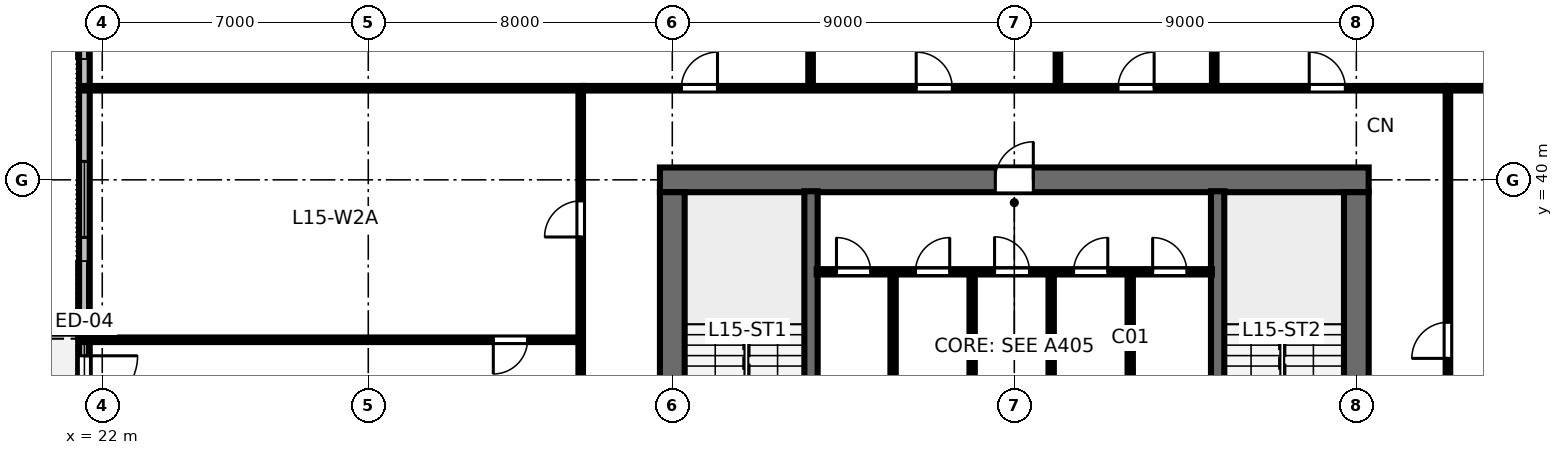
"""IFC4 building model, lengths in metres.
Left out: names, types, materials, properties, quantities, classifications, styles, units other than length and angle.
Written with IfcOpenShell. Run it as: python <this file> out.ifc"""

import sys

from ifc_helpers import new_model, si_unit, direction, frame, frame_2d, origin, place, context, subcontext, project, spatial, rectangle, extrude, element, fill, save


model = new_model("IFC4")
c1 = context("Model", 3, precision=1e-05, world=origin(), true_north=direction((0.0, 1.0)))
c2 = subcontext(c1, "Body", "Model", "MODEL_VIEW")
j1 = project(units=[si_unit("LENGTHUNIT", "METRE"), si_unit("PLANEANGLEUNIT", "RADIAN")], contexts=[c1])
p1 = place(None, origin())
s1 = spatial("IfcSite", under=j1, at=p1, CompositionType="ELEMENT")
p2 = place(p1, origin())
s2 = spatial("IfcBuilding", under=s1, at=p2, CompositionType="ELEMENT")
p3 = place(p2, frame((0.0, 0.0, 60.4)))
s3 = spatial("IfcBuildingStorey", under=s2, at=p3, CompositionType="ELEMENT", Elevation=60.4)
p4 = place(p3, frame((36.675, 40.0, 0.0), z_axis=(0.0, 0.0, 1.0), x_axis=(1.0, 0.0, 0.0)))
e1 = element("IfcWall", 1, at=p4, inside=s3, PredefinedType="SHEAR", context=c2, shape_type="SweptSolid", body=[
    extrude(rectangle(XDim=18.65, YDim=0.65, at=frame_2d((9.325, 0.0))), origin(), (0.0, 0.0, 1.0), 3.36),
])
p5 = place(p4, frame((8.825, 0.0, 0.0)))
e2 = element("IfcOpeningElement", 2, at=p5, cuts=e1, PredefinedType="OPENING", context=c2, shape_type="SweptSolid", body=[
    extrude(rectangle(XDim=1.0, YDim=2.15, at=frame_2d((0.5, 1.075))), frame((0.0, 0.335, 0.0), z_axis=(0.0, -1.0, 0.0), x_axis=(1.0, 0.0, 0.0)), (0.0, 0.0, 1.0), 0.67),
])
p6 = place(p3, frame((37.0, 24.325, 0.0), z_axis=(0.0, 0.0, 1.0), x_axis=(0.0, 1.0, 0.0)))
e3 = element("IfcWall", 3, at=p6, inside=s3, PredefinedType="SHEAR", context=c2, shape_type="SweptSolid", body=[
    extrude(rectangle(XDim=15.35, YDim=0.65, at=frame_2d((7.675, 0.0))), origin(), (0.0, 0.0, 1.0), 3.36),
])
p7 = place(p6, frame((5.2, 0.0, 0.0)))
e4 = element("IfcOpeningElement", 4, at=p7, cuts=e3, PredefinedType="OPENING", context=c2, shape_type="SweptSolid", body=[
    extrude(rectangle(XDim=1.15, YDim=2.15, at=frame_2d((0.575, 1.075))), frame((0.0, 0.335, 0.0), z_axis=(0.0, -1.0, 0.0), x_axis=(1.0, 0.0, 0.0)), (0.0, 0.0, 1.0), 0.67),
])
p8 = place(p3, frame((55.0, 24.325, 0.0), z_axis=(0.0, 0.0, 1.0), x_axis=(0.0, 1.0, 0.0)))
e5 = element("IfcWall", 5, at=p8, inside=s3, PredefinedType="SHEAR", context=c2, shape_type="SweptSolid", body=[
    extrude(rectangle(XDim=15.35, YDim=0.65, at=frame_2d((7.675, 0.0))), origin(), (0.0, 0.0, 1.0), 3.36),
])
p9 = place(p8, frame((5.2, 0.0, 0.0)))
e6 = element("IfcOpeningElement", 6, at=p9, cuts=e5, PredefinedType="OPENING", context=c2, shape_type="SweptSolid", body=[
    extrude(rectangle(XDim=1.15, YDim=2.15, at=frame_2d((0.575, 1.075))), frame((0.0, 0.335, 0.0), z_axis=(0.0, -1.0, 0.0), x_axis=(1.0, 0.0, 0.0)), (0.0, 0.0, 1.0), 0.67),
])
p10 = place(p3, frame((21.53, 49.94, 0.0), z_axis=(0.0, 0.0, 1.0), x_axis=(0.0, -1.0, 0.0)))
e7 = element("IfcWall", 7, at=p10, inside=s3, PredefinedType="STANDARD", context=c2, shape_type="SweptSolid", body=[
    extrude(rectangle(XDim=35.88, YDim=0.28, at=frame_2d((17.94, 0.0))), origin(), (0.0, 0.0, 1.0), 3.36),
])
p11 = place(p10, frame((14.57, 0.0, 0.0)))
e8 = element("IfcOpeningElement", 8, at=p11, cuts=e7, PredefinedType="OPENING", context=c2, shape_type="SweptSolid", body=[
    extrude(rectangle(XDim=1.4, YDim=2.15, at=frame_2d((0.7, 1.075))), frame((0.0, 0.15, 0.0), z_axis=(0.0, -1.0, 0.0), x_axis=(1.0, 0.0, 0.0)), (0.0, 0.0, 1.0), 0.3),
])
p12 = place(p10, frame((1.971, 0.0, 0.8)))
e9 = element("IfcOpeningElement", 9, at=p12, cuts=e7, PredefinedType="OPENING", context=c2, shape_type="SweptSolid", body=[
    extrude(rectangle(XDim=2.0, YDim=1.95, at=frame_2d((1.0, 0.975))), frame((0.0, 0.15, 0.0), z_axis=(0.0, -1.0, 0.0), x_axis=(1.0, 0.0, 0.0)), (0.0, 0.0, 1.0), 0.3),
])
p13 = place(p10, frame((9.456, 0.0, 0.8)))
e10 = element("IfcOpeningElement", 10, at=p13, cuts=e7, PredefinedType="OPENING", context=c2, shape_type="SweptSolid", body=[
    extrude(rectangle(XDim=2.0, YDim=1.95, at=frame_2d((1.0, 0.975))), frame((0.0, 0.15, 0.0), z_axis=(0.0, -1.0, 0.0), x_axis=(1.0, 0.0, 0.0)), (0.0, 0.0, 1.0), 0.3),
])
p14 = place(p10, frame((20.682, 0.0, 0.8)))
e11 = element("IfcOpeningElement", 11, at=p14, cuts=e7, PredefinedType="OPENING", context=c2, shape_type="SweptSolid", body=[
    extrude(rectangle(XDim=2.0, YDim=1.95, at=frame_2d((1.0, 0.975))), frame((0.0, 0.15, 0.0), z_axis=(0.0, -1.0, 0.0), x_axis=(1.0, 0.0, 0.0)), (0.0, 0.0, 1.0), 0.3),
])
p15 = place(p10, frame((24.424, 0.0, 0.8)))
e12 = element("IfcOpeningElement", 12, at=p15, cuts=e7, PredefinedType="OPENING", context=c2, shape_type="SweptSolid", body=[
    extrude(rectangle(XDim=2.0, YDim=1.95, at=frame_2d((1.0, 0.975))), frame((0.0, 0.15, 0.0), z_axis=(0.0, -1.0, 0.0), x_axis=(1.0, 0.0, 0.0)), (0.0, 0.0, 1.0), 0.3),
])
p16 = place(p10, frame((31.909, 0.0, 0.8)))
e13 = element("IfcOpeningElement", 13, at=p16, cuts=e7, PredefinedType="OPENING", context=c2, shape_type="SweptSolid", body=[
    extrude(rectangle(XDim=2.0, YDim=1.95, at=frame_2d((1.0, 0.975))), frame((0.0, 0.15, 0.0), z_axis=(0.0, -1.0, 0.0), x_axis=(1.0, 0.0, 0.0)), (0.0, 0.0, 1.0), 0.3),
])
for number, where, z_axis, x_axis in (
    (14, (40.65, 32.0, 0.0), (0.0, 0.0, 1.0), (0.0, 1.0, 0.0)),
    (15, (51.35, 32.0, 0.0), (0.0, 0.0, 1.0), (0.0, 1.0, 0.0)),
):
    element("IfcWall", number, at=place(p3, frame(where, z_axis=z_axis, x_axis=x_axis)), inside=s3, PredefinedType="SHEAR", context=c2, shape_type="SweptSolid", body=[
        extrude(rectangle(XDim=7.7, YDim=0.35, at=frame_2d((3.85, 0.0))), origin(), (0.0, 0.0, 1.0), 3.6),
    ])
for number, where, z_axis, x_axis in (
    (16, (42.81, 32.05, 0.0), (0.0, 0.0, 1.0), (0.0, 1.0, 0.0)),
    (17, (44.89, 32.05, 0.0), (0.0, 0.0, 1.0), (0.0, 1.0, 0.0)),
    (18, (46.97, 32.05, 0.0), (0.0, 0.0, 1.0), (0.0, 1.0, 0.0)),
    (19, (49.05, 32.05, 0.0), (0.0, 0.0, 1.0), (0.0, 1.0, 0.0)),
):
    element("IfcWall", number, at=place(p3, frame(where, z_axis=z_axis, x_axis=x_axis)), inside=s3, PredefinedType="PARTITIONING", context=c2, shape_type="SweptSolid", body=[
        extrude(rectangle(XDim=5.5, YDim=0.14, at=frame_2d((2.75, 0.0))), origin(), (0.0, 0.0, 1.0), 3.36),
    ])
p17 = place(p3, frame((40.8, 37.58, 0.0), z_axis=(0.0, 0.0, 1.0), x_axis=(1.0, 0.0, 0.0)))
e20 = element("IfcWall", 20, at=p17, inside=s3, PredefinedType="PARTITIONING", context=c2, shape_type="SweptSolid", body=[
    extrude(rectangle(XDim=10.4, YDim=0.14, at=frame_2d((5.2, 0.0))), origin(), (0.0, 0.0, 1.0), 3.36),
])
p18 = place(p17, frame((0.52, 0.0, 0.0)))
e21 = element("IfcOpeningElement", 21, at=p18, cuts=e20, PredefinedType="OPENING", context=c2, shape_type="SweptSolid", body=[
    extrude(rectangle(XDim=0.9, YDim=2.15, at=frame_2d((0.45, 1.075))), frame((0.0, 0.08, 0.0), z_axis=(0.0, -1.0, 0.0), x_axis=(1.0, 0.0, 0.0)), (0.0, 0.0, 1.0), 0.16),
])
p19 = place(p17, frame((2.6, 0.0, 0.0)))
e22 = element("IfcOpeningElement", 22, at=p19, cuts=e20, PredefinedType="OPENING", context=c2, shape_type="SweptSolid", body=[
    extrude(rectangle(XDim=0.9, YDim=2.15, at=frame_2d((0.45, 1.075))), frame((0.0, 0.08, 0.0), z_axis=(0.0, -1.0, 0.0), x_axis=(1.0, 0.0, 0.0)), (0.0, 0.0, 1.0), 0.16),
])
p20 = place(p17, frame((4.68, 0.0, 0.0)))
e23 = element("IfcOpeningElement", 23, at=p20, cuts=e20, PredefinedType="OPENING", context=c2, shape_type="SweptSolid", body=[
    extrude(rectangle(XDim=0.92, YDim=2.15, at=frame_2d((0.46, 1.075))), frame((0.0, 0.08, 0.0), z_axis=(0.0, -1.0, 0.0), x_axis=(1.0, 0.0, 0.0)), (0.0, 0.0, 1.0), 0.16),
])
p21 = place(p17, frame((6.76, 0.0, 0.0)))
e24 = element("IfcOpeningElement", 24, at=p21, cuts=e20, PredefinedType="OPENING", context=c2, shape_type="SweptSolid", body=[
    extrude(rectangle(XDim=0.9, YDim=2.15, at=frame_2d((0.45, 1.075))), frame((0.0, 0.08, 0.0), z_axis=(0.0, -1.0, 0.0), x_axis=(1.0, 0.0, 0.0)), (0.0, 0.0, 1.0), 0.16),
])
p22 = place(p17, frame((8.84, 0.0, 0.0)))
e25 = element("IfcOpeningElement", 25, at=p22, cuts=e20, PredefinedType="OPENING", context=c2, shape_type="SweptSolid", body=[
    extrude(rectangle(XDim=0.9, YDim=2.15, at=frame_2d((0.45, 1.075))), frame((0.0, 0.08, 0.0), z_axis=(0.0, -1.0, 0.0), x_axis=(1.0, 0.0, 0.0)), (0.0, 0.0, 1.0), 0.16),
])
p23 = place(p3, frame((40.639, 42.41, 0.0), z_axis=(0.0, 0.0, 1.0), x_axis=(0.0, 1.0, 0.0)))
e26 = element("IfcWall", 26, at=p23, inside=s3, PredefinedType="PARTITIONING", context=c2, shape_type="SweptSolid", body=[
    extrude(rectangle(XDim=11.11, YDim=0.12, at=frame_2d((5.555, 0.0))), origin(), (0.0, 0.0, 1.0), 2.64),
])
p24 = place(p23, frame((1.4, 0.0, 0.0)))
e27 = element("IfcOpeningElement", 27, at=p24, cuts=e26, PredefinedType="OPENING", context=c2, shape_type="SweptSolid", body=[
    extrude(rectangle(XDim=0.9, YDim=2.15, at=frame_2d((0.45, 1.075))), frame((0.0, 0.07, 0.0), z_axis=(0.0, -1.0, 0.0), x_axis=(1.0, 0.0, 0.0)), (0.0, 0.0, 1.0), 0.14),
])
p25 = place(p3, frame((47.148, 42.41, 0.0), z_axis=(0.0, 0.0, 1.0), x_axis=(0.0, 1.0, 0.0)))
e28 = element("IfcWall", 28, at=p25, inside=s3, PredefinedType="PARTITIONING", context=c2, shape_type="SweptSolid", body=[
    extrude(rectangle(XDim=11.11, YDim=0.12, at=frame_2d((5.555, 0.0))), origin(), (0.0, 0.0, 1.0), 2.64),
])
p26 = place(p25, frame((1.4, 0.0, 0.0)))
e29 = element("IfcOpeningElement", 29, at=p26, cuts=e28, PredefinedType="OPENING", context=c2, shape_type="SweptSolid", body=[
    extrude(rectangle(XDim=0.9, YDim=2.15, at=frame_2d((0.45, 1.075))), frame((0.0, 0.07, 0.0), z_axis=(0.0, -1.0, 0.0), x_axis=(1.0, 0.0, 0.0)), (0.0, 0.0, 1.0), 0.14),
])
p27 = place(p3, frame((51.261, 42.41, 0.0), z_axis=(0.0, 0.0, 1.0), x_axis=(0.0, 1.0, 0.0)))
e30 = element("IfcWall", 30, at=p27, inside=s3, PredefinedType="PARTITIONING", context=c2, shape_type="SweptSolid", body=[
    extrude(rectangle(XDim=11.11, YDim=0.12, at=frame_2d((5.555, 0.0))), origin(), (0.0, 0.0, 1.0), 2.64),
])
p28 = place(p27, frame((1.4, 0.0, 0.0)))
e31 = element("IfcOpeningElement", 31, at=p28, cuts=e30, PredefinedType="OPENING", context=c2, shape_type="SweptSolid", body=[
    extrude(rectangle(XDim=0.9, YDim=2.15, at=frame_2d((0.45, 1.075))), frame((0.0, 0.07, 0.0), z_axis=(0.0, -1.0, 0.0), x_axis=(1.0, 0.0, 0.0)), (0.0, 0.0, 1.0), 0.14),
])
p29 = place(p3, frame((34.65, 42.41, 0.0), z_axis=(0.0, 0.0, 1.0), x_axis=(1.0, 0.0, 0.0)))
e32 = element("IfcWall", 32, at=p29, inside=s3, PredefinedType="PARTITIONING", context=c2, shape_type="SweptSolid", body=[
    extrude(rectangle(XDim=22.7, YDim=0.12, at=frame_2d((11.35, 0.0))), origin(), (0.0, 0.0, 1.0), 2.64),
])
p30 = place(p29, frame((2.59, 0.0, 0.0)))
e33 = element("IfcOpeningElement", 33, at=p30, cuts=e32, PredefinedType="OPENING", context=c2, shape_type="SweptSolid", body=[
    extrude(rectangle(XDim=0.95, YDim=2.15, at=frame_2d((0.475, 1.075))), frame((0.0, 0.07, 0.0), z_axis=(0.0, -1.0, 0.0), x_axis=(1.0, 0.0, 0.0)), (0.0, 0.0, 1.0), 0.14),
])
p31 = place(p29, frame((8.768, 0.0, 0.0)))
e34 = element("IfcOpeningElement", 34, at=p31, cuts=e32, PredefinedType="OPENING", context=c2, shape_type="SweptSolid", body=[
    extrude(rectangle(XDim=0.95, YDim=2.15, at=frame_2d((0.475, 1.075))), frame((0.0, 0.07, 0.0), z_axis=(0.0, -1.0, 0.0), x_axis=(1.0, 0.0, 0.0)), (0.0, 0.0, 1.0), 0.14),
])
p32 = place(p29, frame((14.079, 0.0, 0.0)))
e35 = element("IfcOpeningElement", 35, at=p32, cuts=e32, PredefinedType="OPENING", context=c2, shape_type="SweptSolid", body=[
    extrude(rectangle(XDim=0.95, YDim=2.15, at=frame_2d((0.475, 1.075))), frame((0.0, 0.07, 0.0), z_axis=(0.0, -1.0, 0.0), x_axis=(1.0, 0.0, 0.0)), (0.0, 0.0, 1.0), 0.14),
])
p33 = place(p29, frame((19.11, 0.0, 0.0)))
e36 = element("IfcOpeningElement", 36, at=p33, cuts=e32, PredefinedType="OPENING", context=c2, shape_type="SweptSolid", body=[
    extrude(rectangle(XDim=0.95, YDim=2.15, at=frame_2d((0.475, 1.075))), frame((0.0, 0.07, 0.0), z_axis=(0.0, -1.0, 0.0), x_axis=(1.0, 0.0, 0.0)), (0.0, 0.0, 1.0), 0.14),
])
p34 = place(p3, frame((34.59, 35.791, 0.0), z_axis=(0.0, 0.0, 1.0), x_axis=(-1.0, 0.0, 0.0)))
e37 = element("IfcWall", 37, at=p34, inside=s3, PredefinedType="PARTITIONING", context=c2, shape_type="SweptSolid", body=[
    extrude(rectangle(XDim=13.06, YDim=0.12, at=frame_2d((6.53, 0.0))), origin(), (0.0, 0.0, 1.0), 2.64),
])
p35 = place(p34, frame((1.4, 0.0, 0.0)))
e38 = element("IfcOpeningElement", 38, at=p35, cuts=e37, PredefinedType="OPENING", context=c2, shape_type="SweptSolid", body=[
    extrude(rectangle(XDim=0.9, YDim=2.15, at=frame_2d((0.45, 1.075))), frame((0.0, 0.07, 0.0), z_axis=(0.0, -1.0, 0.0), x_axis=(1.0, 0.0, 0.0)), (0.0, 0.0, 1.0), 0.14),
])
p36 = place(p3, frame((34.59, 21.65, 0.0), z_axis=(0.0, 0.0, 1.0), x_axis=(0.0, 1.0, 0.0)))
e39 = element("IfcWall", 39, at=p36, inside=s3, PredefinedType="PARTITIONING", context=c2, shape_type="SweptSolid", body=[
    extrude(rectangle(XDim=20.7, YDim=0.12, at=frame_2d((10.35, 0.0))), origin(), (0.0, 0.0, 1.0), 2.64),
])
p37 = place(p36, frame((6.696, 0.0, 0.0)))
e40 = element("IfcOpeningElement", 40, at=p37, cuts=e39, PredefinedType="OPENING", context=c2, shape_type="SweptSolid", body=[
    extrude(rectangle(XDim=0.95, YDim=2.15, at=frame_2d((0.475, 1.075))), frame((0.0, 0.07, 0.0), z_axis=(0.0, -1.0, 0.0), x_axis=(1.0, 0.0, 0.0)), (0.0, 0.0, 1.0), 0.14),
])
p38 = place(p36, frame((16.846, 0.0, 0.0)))
e41 = element("IfcOpeningElement", 41, at=p38, cuts=e39, PredefinedType="OPENING", context=c2, shape_type="SweptSolid", body=[
    extrude(rectangle(XDim=0.95, YDim=2.15, at=frame_2d((0.475, 1.075))), frame((0.0, 0.07, 0.0), z_axis=(0.0, -1.0, 0.0), x_axis=(1.0, 0.0, 0.0)), (0.0, 0.0, 1.0), 0.14),
])
p39 = place(p3, frame((57.41, 21.65, 0.0), z_axis=(0.0, 0.0, 1.0), x_axis=(0.0, 1.0, 0.0)))
e42 = element("IfcWall", 42, at=p39, inside=s3, PredefinedType="PARTITIONING", context=c2, shape_type="SweptSolid", body=[
    extrude(rectangle(XDim=20.7, YDim=0.12, at=frame_2d((10.35, 0.0))), origin(), (0.0, 0.0, 1.0), 2.64),
])
p40 = place(p39, frame((3.502, 0.0, 0.0)))
e43 = element("IfcOpeningElement", 43, at=p40, cuts=e42, PredefinedType="OPENING", context=c2, shape_type="SweptSolid", body=[
    extrude(rectangle(XDim=0.95, YDim=2.15, at=frame_2d((0.475, 1.075))), frame((0.0, 0.07, 0.0), z_axis=(0.0, -1.0, 0.0), x_axis=(1.0, 0.0, 0.0)), (0.0, 0.0, 1.0), 0.14),
])
p41 = place(p39, frame((13.652, 0.0, 0.0)))
e44 = element("IfcOpeningElement", 44, at=p41, cuts=e42, PredefinedType="OPENING", context=c2, shape_type="SweptSolid", body=[
    extrude(rectangle(XDim=0.95, YDim=2.15, at=frame_2d((0.475, 1.075))), frame((0.0, 0.07, 0.0), z_axis=(0.0, -1.0, 0.0), x_axis=(1.0, 0.0, 0.0)), (0.0, 0.0, 1.0), 0.14),
])
for number, where, z_axis, x_axis in (
    (45, (34.65, 42.41, 0.0), (0.0, 0.0, 1.0), (-1.0, 0.0, 0.0)),
    (46, (57.35, 42.41, 0.0), (0.0, 0.0, 1.0), (1.0, 0.0, 0.0)),
):
    element("IfcWall", number, at=place(p3, frame(where, z_axis=z_axis, x_axis=x_axis)), inside=s3, PredefinedType="PARTITIONING", context=c2, shape_type="SweptSolid", body=[
        extrude(rectangle(XDim=13.12, YDim=0.12, at=frame_2d((6.56, 0.0))), origin(), (0.0, 0.0, 1.0), 2.64),
    ])
p42 = place(p11, origin())
e47 = element("IfcDoor", 47, at=p42, inside=s3, OperationType="SINGLE_SWING_LEFT", PredefinedType="DOOR", context=c2, shape_type="SweptSolid", body=[
    extrude(rectangle(XDim=1.4, YDim=2.15, at=frame_2d((0.7, 1.075))), frame((0.0, 0.025, 0.0), z_axis=(0.0, -1.0, 0.0), x_axis=(1.0, 0.0, 0.0)), (0.0, 0.0, 1.0), 0.05),
])
fill(e8, e47)
p43 = place(p13, origin())
e48 = element("IfcWindow", 48, at=p43, inside=s3, PartitioningType="SINGLE_PANEL", PredefinedType="WINDOW", context=c2, shape_type="SweptSolid", body=[
    extrude(rectangle(XDim=2.0, YDim=1.95, at=frame_2d((1.0, 0.975))), frame((0.0, 0.03, 0.0), z_axis=(0.0, -1.0, 0.0), x_axis=(1.0, 0.0, 0.0)), (0.0, 0.0, 1.0), 0.06),
])
fill(e10, e48)
p44 = place(p5, origin())
e49 = element("IfcDoor", 49, at=p44, inside=s3, OperationType="SINGLE_SWING_RIGHT", PredefinedType="DOOR", context=c2, shape_type="SweptSolid", body=[
    extrude(rectangle(XDim=1.0, YDim=2.15, at=frame_2d((0.5, 1.075))), frame((0.0, 0.025, 0.0), z_axis=(0.0, -1.0, 0.0), x_axis=(1.0, 0.0, 0.0)), (0.0, 0.0, 1.0), 0.05),
])
fill(e2, e49)
p45 = place(p18, origin())
e50 = element("IfcDoor", 50, at=p45, inside=s3, OperationType="SINGLE_SWING_LEFT", PredefinedType="DOOR", context=c2, shape_type="SweptSolid", body=[
    extrude(rectangle(XDim=0.9, YDim=2.15, at=frame_2d((0.45, 1.075))), frame((0.0, 0.025, 0.0), z_axis=(0.0, -1.0, 0.0), x_axis=(1.0, 0.0, 0.0)), (0.0, 0.0, 1.0), 0.05),
])
fill(e21, e50)
p46 = place(p19, origin())
e51 = element("IfcDoor", 51, at=p46, inside=s3, OperationType="SINGLE_SWING_RIGHT", PredefinedType="DOOR", context=c2, shape_type="SweptSolid", body=[
    extrude(rectangle(XDim=0.9, YDim=2.15, at=frame_2d((0.45, 1.075))), frame((0.0, 0.025, 0.0), z_axis=(0.0, -1.0, 0.0), x_axis=(1.0, 0.0, 0.0)), (0.0, 0.0, 1.0), 0.05),
])
fill(e22, e51)
p47 = place(p20, origin())
e52 = element("IfcDoor", 52, at=p47, inside=s3, OperationType="SINGLE_SWING_LEFT", PredefinedType="DOOR", context=c2, shape_type="SweptSolid", body=[
    extrude(rectangle(XDim=0.92, YDim=2.15, at=frame_2d((0.46, 1.075))), frame((0.0, 0.025, 0.0), z_axis=(0.0, -1.0, 0.0), x_axis=(1.0, 0.0, 0.0)), (0.0, 0.0, 1.0), 0.05),
])
fill(e23, e52)
p48 = place(p21, origin())
e53 = element("IfcDoor", 53, at=p48, inside=s3, OperationType="SINGLE_SWING_RIGHT", PredefinedType="DOOR", context=c2, shape_type="SweptSolid", body=[
    extrude(rectangle(XDim=0.9, YDim=2.15, at=frame_2d((0.45, 1.075))), frame((0.0, 0.025, 0.0), z_axis=(0.0, -1.0, 0.0), x_axis=(1.0, 0.0, 0.0)), (0.0, 0.0, 1.0), 0.05),
])
fill(e24, e53)
p49 = place(p22, origin())
e54 = element("IfcDoor", 54, at=p49, inside=s3, OperationType="SINGLE_SWING_LEFT", PredefinedType="DOOR", context=c2, shape_type="SweptSolid", body=[
    extrude(rectangle(XDim=0.9, YDim=2.15, at=frame_2d((0.45, 1.075))), frame((0.0, 0.025, 0.0), z_axis=(0.0, -1.0, 0.0), x_axis=(1.0, 0.0, 0.0)), (0.0, 0.0, 1.0), 0.05),
])
fill(e25, e54)
p50 = place(p30, origin())
e55 = element("IfcDoor", 55, at=p50, inside=s3, OperationType="SINGLE_SWING_RIGHT", PredefinedType="DOOR", context=c2, shape_type="SweptSolid", body=[
    extrude(rectangle(XDim=0.95, YDim=2.15, at=frame_2d((0.475, 1.075))), frame((0.0, 0.025, 0.0), z_axis=(0.0, -1.0, 0.0), x_axis=(1.0, 0.0, 0.0)), (0.0, 0.0, 1.0), 0.05),
])
fill(e33, e55)
p51 = place(p31, origin())
e56 = element("IfcDoor", 56, at=p51, inside=s3, OperationType="SINGLE_SWING_LEFT", PredefinedType="DOOR", context=c2, shape_type="SweptSolid", body=[
    extrude(rectangle(XDim=0.95, YDim=2.15, at=frame_2d((0.475, 1.075))), frame((0.0, 0.025, 0.0), z_axis=(0.0, -1.0, 0.0), x_axis=(1.0, 0.0, 0.0)), (0.0, 0.0, 1.0), 0.05),
])
fill(e34, e56)
p52 = place(p32, origin())
e57 = element("IfcDoor", 57, at=p52, inside=s3, OperationType="SINGLE_SWING_RIGHT", PredefinedType="DOOR", context=c2, shape_type="SweptSolid", body=[
    extrude(rectangle(XDim=0.95, YDim=2.15, at=frame_2d((0.475, 1.075))), frame((0.0, 0.025, 0.0), z_axis=(0.0, -1.0, 0.0), x_axis=(1.0, 0.0, 0.0)), (0.0, 0.0, 1.0), 0.05),
])
fill(e35, e57)
p53 = place(p33, origin())
e58 = element("IfcDoor", 58, at=p53, inside=s3, OperationType="SINGLE_SWING_LEFT", PredefinedType="DOOR", context=c2, shape_type="SweptSolid", body=[
    extrude(rectangle(XDim=0.95, YDim=2.15, at=frame_2d((0.475, 1.075))), frame((0.0, 0.025, 0.0), z_axis=(0.0, -1.0, 0.0), x_axis=(1.0, 0.0, 0.0)), (0.0, 0.0, 1.0), 0.05),
])
fill(e36, e58)
p54 = place(p35, origin())
e59 = element("IfcDoor", 59, at=p54, inside=s3, OperationType="SINGLE_SWING_RIGHT", PredefinedType="DOOR", context=c2, shape_type="SweptSolid", body=[
    extrude(rectangle(XDim=0.9, YDim=2.15, at=frame_2d((0.45, 1.075))), frame((0.0, 0.025, 0.0), z_axis=(0.0, -1.0, 0.0), x_axis=(1.0, 0.0, 0.0)), (0.0, 0.0, 1.0), 0.05),
])
fill(e38, e59)
p55 = place(p38, origin())
e60 = element("IfcDoor", 60, at=p55, inside=s3, OperationType="SINGLE_SWING_LEFT", PredefinedType="DOOR", context=c2, shape_type="SweptSolid", body=[
    extrude(rectangle(XDim=0.95, YDim=2.15, at=frame_2d((0.475, 1.075))), frame((0.0, 0.025, 0.0), z_axis=(0.0, -1.0, 0.0), x_axis=(1.0, 0.0, 0.0)), (0.0, 0.0, 1.0), 0.05),
])
fill(e41, e60)
p56 = place(p41, origin())
e61 = element("IfcDoor", 61, at=p56, inside=s3, OperationType="SINGLE_SWING_LEFT", PredefinedType="DOOR", context=c2, shape_type="SweptSolid", body=[
    extrude(rectangle(XDim=0.95, YDim=2.15, at=frame_2d((0.475, 1.075))), frame((0.0, 0.025, 0.0), z_axis=(0.0, -1.0, 0.0), x_axis=(1.0, 0.0, 0.0)), (0.0, 0.0, 1.0), 0.05),
])
fill(e44, e61)
save(model, sys.argv[1])
